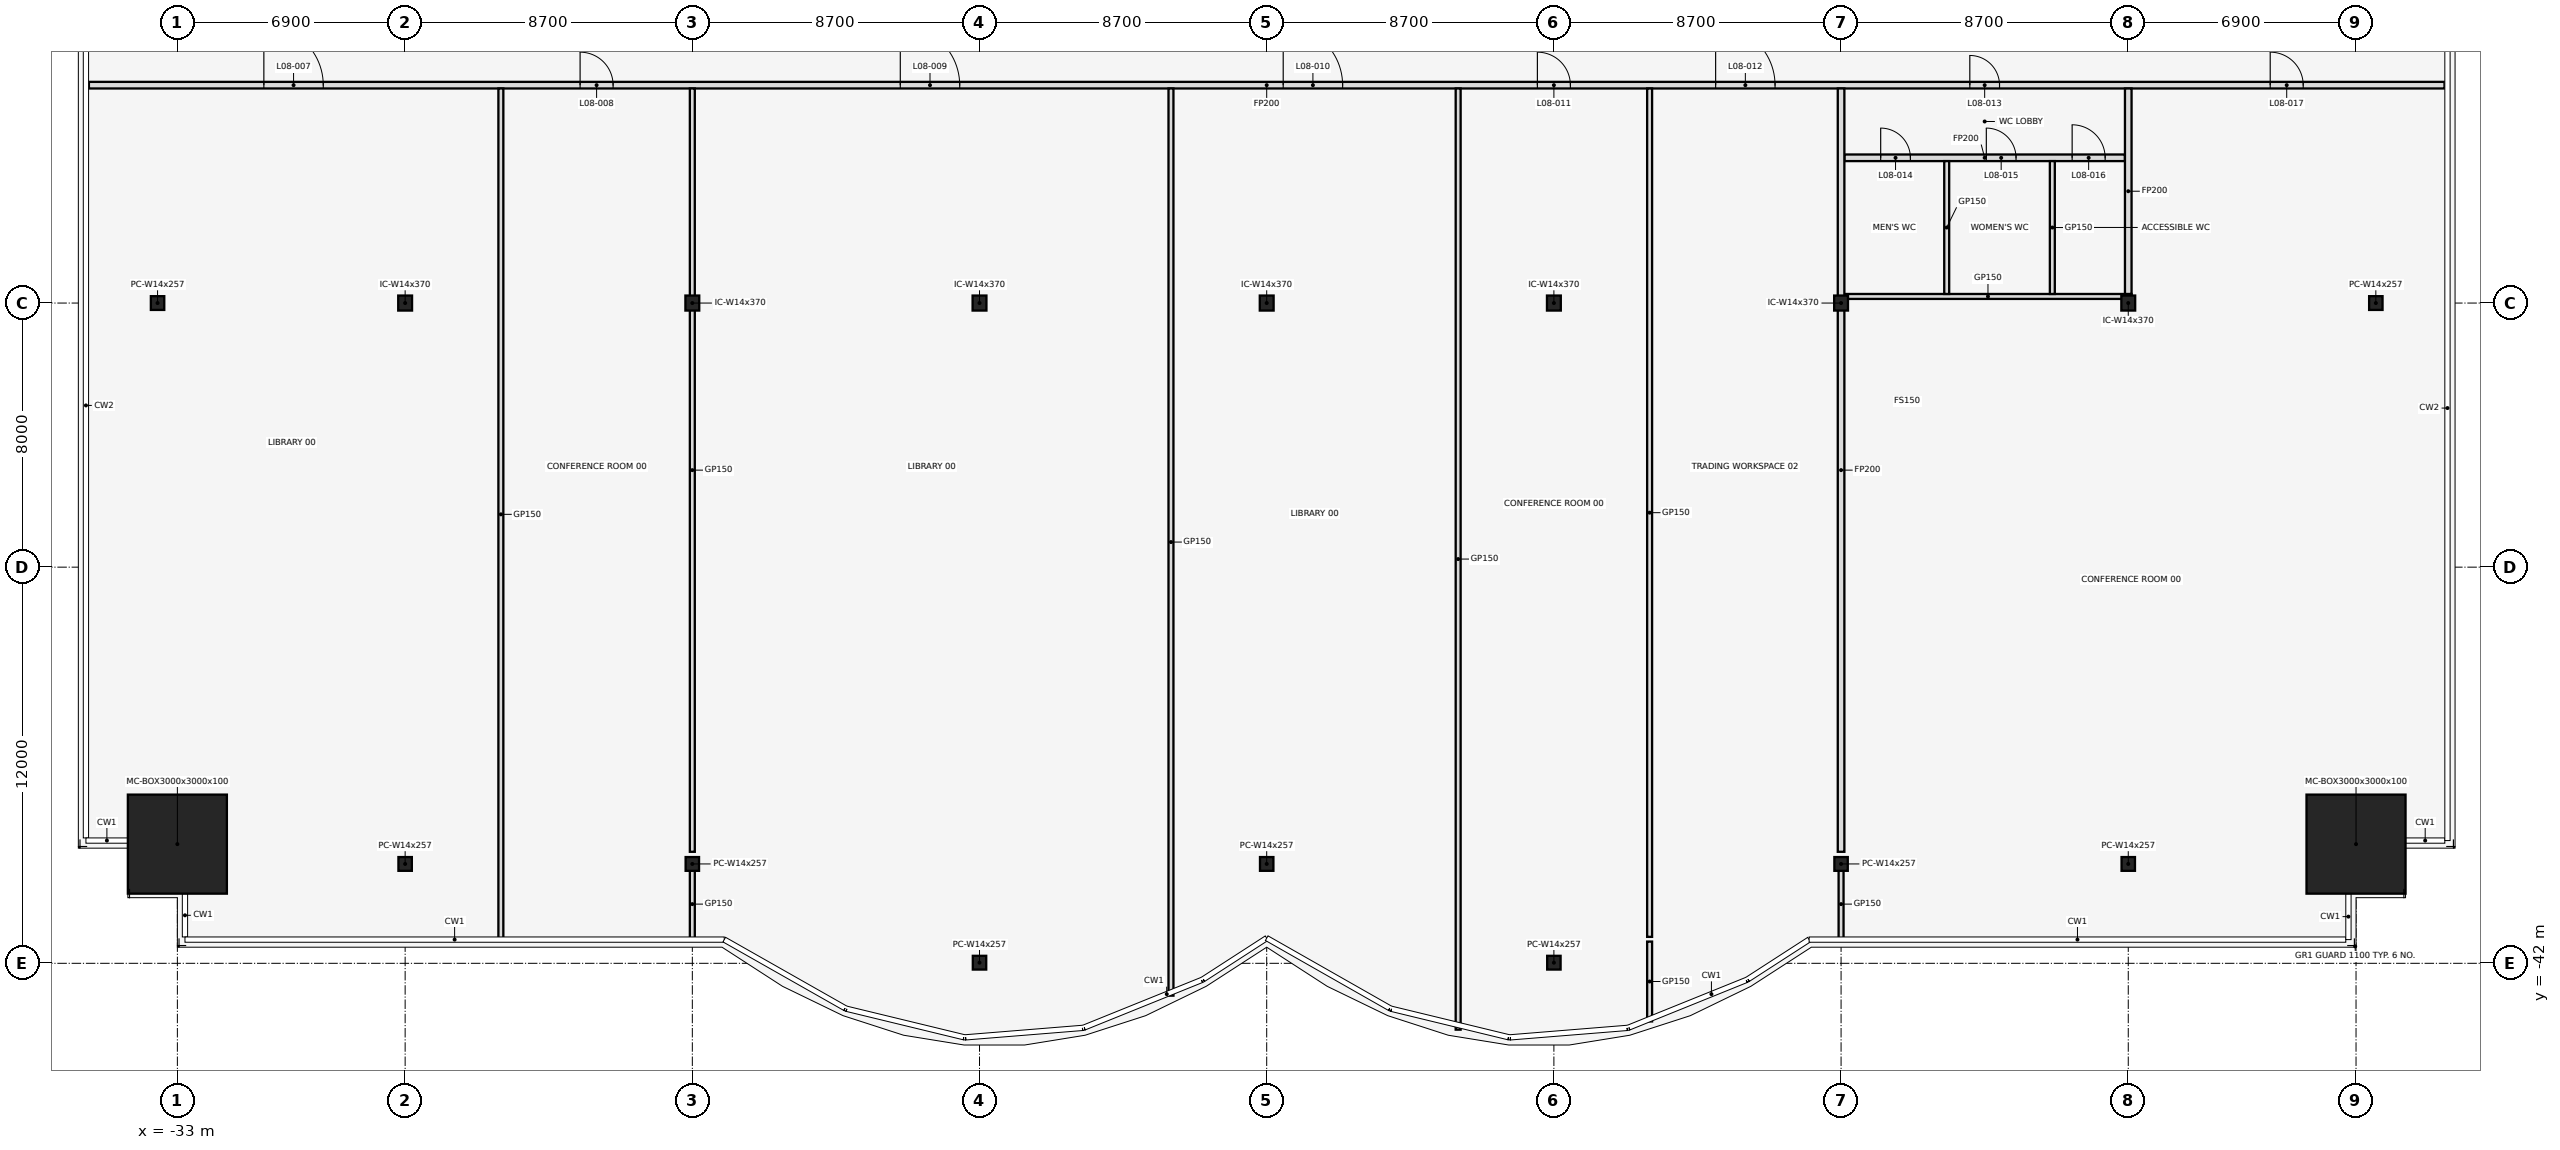
"""IFC4 building model, lengths in metres.
Left out: names, types, materials, properties, quantities, classifications, styles, units other than length and angle.
Written with IfcOpenShell. Run it as: python <this file> out.ifc"""

import sys

from ifc_helpers import new_model, si_unit, direction, frame, frame_2d, origin, origin_2d, place, context, subcontext, project, spatial, rectangle, hollow_rectangle, i_section, extrude, element, fill, save


model = new_model("IFC4")
c1 = context("Model", 3, precision=1e-05, world=origin(), true_north=direction((0.0, 1.0)))
c2 = subcontext(c1, "Body", "Model", "MODEL_VIEW")
j1 = project(units=[si_unit("LENGTHUNIT", "METRE"), si_unit("PLANEANGLEUNIT", "RADIAN")], contexts=[c1])
p1 = place(None, origin())
s1 = spatial("IfcSite", under=j1, at=p1, CompositionType="ELEMENT")
p2 = place(p1, origin())
s2 = spatial("IfcBuilding", under=s1, at=p2, CompositionType="ELEMENT")
p3 = place(p2, frame((0.0, 0.0, 44.0)))
s3 = spatial("IfcBuildingStorey", under=s2, at=p3, CompositionType="ELEMENT", Elevation=44.0)
p4 = place(p3, frame((-33.0, -38.39, 0.0), z_axis=(0.0, 0.0, 1.0), x_axis=(1.0, 0.0, 0.0)))
e1 = element("IfcColumn", 1, at=p4, inside=s3, PredefinedType="COLUMN", context=c2, shape_type="SweptSolid", body=[
    extrude(hollow_rectangle(XDim=3.0, YDim=3.0, WallThickness=0.1, at=origin_2d()), origin(), (0.0, 0.0, 1.0), 4.5),
])
for number, where, z_axis, x_axis in (
    (2, (-26.1, -38.99, 0.0), (0.0, 0.0, 1.0), (1.0, 0.0, 0.0)),
    (3, (-17.4, -38.99, 0.0), (0.0, 0.0, 1.0), (1.0, 0.0, 0.0)),
    (4, (-8.7, -41.981, 0.0), (0.0, 0.0, 1.0), (1.0, 0.0, 0.0)),
    (5, (0.0, -38.99, 0.0), (0.0, 0.0, 1.0), (1.0, 0.0, 0.0)),
    (6, (8.7, -41.981, 0.0), (0.0, 0.0, 1.0), (1.0, 0.0, 0.0)),
    (7, (17.4, -38.99, 0.0), (0.0, 0.0, 1.0), (1.0, 0.0, 0.0)),
    (8, (26.1, -38.99, 0.0), (0.0, 0.0, 1.0), (1.0, 0.0, 0.0)),
):
    element("IfcColumn", number, at=place(p3, frame(where, z_axis=z_axis, x_axis=x_axis)), inside=s3, PredefinedType="COLUMN", context=c2, shape_type="SweptSolid", body=[
        extrude(i_section(OverallWidth=0.406, OverallDepth=0.417, WebThickness=0.03, FlangeThickness=0.048, at=origin_2d()), origin(), (0.0, 0.0, 1.0), 4.5),
    ])
p5 = place(p3, frame((33.0, -38.39, 0.0), z_axis=(0.0, 0.0, 1.0), x_axis=(1.0, 0.0, 0.0)))
e9 = element("IfcColumn", 9, at=p5, inside=s3, PredefinedType="COLUMN", context=c2, shape_type="SweptSolid", body=[
    extrude(hollow_rectangle(XDim=3.0, YDim=3.0, WallThickness=0.1, at=origin_2d()), origin(), (0.0, 0.0, 1.0), 4.5),
])
for number, where, z_axis, x_axis in (
    (10, (-33.6, -22.0, 0.0), (0.0, 0.0, 1.0), (1.0, 0.0, 0.0)),
    (11, (33.6, -22.0, 0.0), (0.0, 0.0, 1.0), (1.0, 0.0, 0.0)),
):
    element("IfcColumn", number, at=place(p3, frame(where, z_axis=z_axis, x_axis=x_axis)), inside=s3, PredefinedType="COLUMN", context=c2, shape_type="SweptSolid", body=[
        extrude(i_section(OverallWidth=0.406, OverallDepth=0.417, WebThickness=0.03, FlangeThickness=0.048, at=origin_2d()), origin(), (0.0, 0.0, 1.0), 4.5),
    ])
for number, where, z_axis, x_axis in (
    (12, (-26.1, -22.0, 0.0), (0.0, 0.0, 1.0), (1.0, 0.0, 0.0)),
    (13, (-17.4, -22.0, 0.0), (0.0, 0.0, 1.0), (1.0, 0.0, 0.0)),
    (14, (-8.7, -22.0, 0.0), (0.0, 0.0, 1.0), (1.0, 0.0, 0.0)),
    (15, (0.0, -22.0, 0.0), (0.0, 0.0, 1.0), (1.0, 0.0, 0.0)),
    (16, (8.7, -22.0, 0.0), (0.0, 0.0, 1.0), (1.0, 0.0, 0.0)),
    (17, (17.4, -22.0, 0.0), (0.0, 0.0, 1.0), (1.0, 0.0, 0.0)),
    (18, (26.1, -22.0, 0.0), (0.0, 0.0, 1.0), (1.0, 0.0, 0.0)),
):
    element("IfcColumn", number, at=place(p3, frame(where, z_axis=z_axis, x_axis=x_axis)), inside=s3, PredefinedType="COLUMN", context=c2, shape_type="SweptSolid", body=[
        extrude(i_section(OverallWidth=0.419, OverallDepth=0.455, WebThickness=0.042, FlangeThickness=0.068, at=origin_2d()), origin(), (0.0, 0.0, 1.0), 4.5),
    ])
p6 = place(p3, frame((17.5, -21.8, 0.0), z_axis=(0.0, 0.0, 1.0), x_axis=(1.0, 0.0, 0.0)))
e19 = element("IfcWall", 19, at=p6, inside=s3, PredefinedType="PARTITIONING", context=c2, shape_type="SweptSolid", body=[
    extrude(rectangle(XDim=8.7, YDim=0.15, at=frame_2d((4.35, 0.0))), origin(), (0.0, 0.0, 1.0), 3.418),
])
p7 = place(p3, frame((17.5, -17.6, 0.0), z_axis=(0.0, 0.0, 1.0), x_axis=(1.0, 0.0, 0.0)))
e20 = element("IfcWall", 20, at=p7, inside=s3, PredefinedType="PARTITIONING", context=c2, shape_type="SweptSolid", body=[
    extrude(rectangle(XDim=8.5, YDim=0.2, at=frame_2d((4.25, 0.0))), origin(), (0.0, 0.0, 1.0), 3.418),
])
p8 = place(p7, frame((1.1, 0.0, 0.0)))
e21 = element("IfcOpeningElement", 21, at=p8, cuts=e20, PredefinedType="OPENING", context=c2, shape_type="SweptSolid", body=[
    extrude(rectangle(XDim=0.9, YDim=2.1, at=frame_2d((0.45, 1.05))), frame((0.0, 0.112, 0.0), z_axis=(0.0, -1.0, 0.0), x_axis=(1.0, 0.0, 0.0)), (0.0, 0.0, 1.0), 0.224),
])
p9 = place(p7, frame((4.3, 0.0, 0.0)))
e22 = element("IfcOpeningElement", 22, at=p9, cuts=e20, PredefinedType="OPENING", context=c2, shape_type="SweptSolid", body=[
    extrude(rectangle(XDim=0.9, YDim=2.1, at=frame_2d((0.45, 1.05))), frame((0.0, 0.112, 0.0), z_axis=(0.0, -1.0, 0.0), x_axis=(1.0, 0.0, 0.0)), (0.0, 0.0, 1.0), 0.224),
])
p10 = place(p7, frame((6.9, 0.0, 0.0)))
e23 = element("IfcOpeningElement", 23, at=p10, cuts=e20, PredefinedType="OPENING", context=c2, shape_type="SweptSolid", body=[
    extrude(rectangle(XDim=1.0, YDim=2.1, at=frame_2d((0.5, 1.05))), frame((0.0, 0.112, 0.0), z_axis=(0.0, -1.0, 0.0), x_axis=(1.0, 0.0, 0.0)), (0.0, 0.0, 1.0), 0.224),
])
p11 = place(p3, frame((-35.68, -15.4, 0.0), z_axis=(0.0, 0.0, 1.0), x_axis=(1.0, 0.0, 0.0)))
e24 = element("IfcWall", 24, at=p11, inside=s3, PredefinedType="PARTITIONING", context=c2, shape_type="SweptSolid", body=[
    extrude(rectangle(XDim=71.36, YDim=0.2, at=frame_2d((35.68, 0.0))), origin(), (0.0, 0.0, 1.0), 3.418),
])
p12 = place(p11, frame((5.3, 0.0, 0.0)))
e25 = element("IfcOpeningElement", 25, at=p12, cuts=e24, PredefinedType="OPENING", context=c2, shape_type="SweptSolid", body=[
    extrude(rectangle(XDim=1.8, YDim=2.1, at=frame_2d((0.9, 1.05))), frame((0.0, 0.112, 0.0), z_axis=(0.0, -1.0, 0.0), x_axis=(1.0, 0.0, 0.0)), (0.0, 0.0, 1.0), 0.224),
])
p13 = place(p11, frame((14.88, 0.0, 0.0)))
e26 = element("IfcOpeningElement", 26, at=p13, cuts=e24, PredefinedType="OPENING", context=c2, shape_type="SweptSolid", body=[
    extrude(rectangle(XDim=1.0, YDim=2.1, at=frame_2d((0.5, 1.05))), frame((0.0, 0.112, 0.0), z_axis=(0.0, -1.0, 0.0), x_axis=(1.0, 0.0, 0.0)), (0.0, 0.0, 1.0), 0.224),
])
p14 = place(p11, frame((24.58, 0.0, 0.0)))
e27 = element("IfcOpeningElement", 27, at=p14, cuts=e24, PredefinedType="OPENING", context=c2, shape_type="SweptSolid", body=[
    extrude(rectangle(XDim=1.8, YDim=2.1, at=frame_2d((0.9, 1.05))), frame((0.0, 0.112, 0.0), z_axis=(0.0, -1.0, 0.0), x_axis=(1.0, 0.0, 0.0)), (0.0, 0.0, 1.0), 0.224),
])
p15 = place(p11, frame((36.18, 0.0, 0.0)))
e28 = element("IfcOpeningElement", 28, at=p15, cuts=e24, PredefinedType="OPENING", context=c2, shape_type="SweptSolid", body=[
    extrude(rectangle(XDim=1.8, YDim=2.1, at=frame_2d((0.9, 1.05))), frame((0.0, 0.112, 0.0), z_axis=(0.0, -1.0, 0.0), x_axis=(1.0, 0.0, 0.0)), (0.0, 0.0, 1.0), 0.224),
])
p16 = place(p11, frame((43.88, 0.0, 0.0)))
e29 = element("IfcOpeningElement", 29, at=p16, cuts=e24, PredefinedType="OPENING", context=c2, shape_type="SweptSolid", body=[
    extrude(rectangle(XDim=1.0, YDim=2.1, at=frame_2d((0.5, 1.05))), frame((0.0, 0.112, 0.0), z_axis=(0.0, -1.0, 0.0), x_axis=(1.0, 0.0, 0.0)), (0.0, 0.0, 1.0), 0.224),
])
p17 = place(p11, frame((49.28, 0.0, 0.0)))
e30 = element("IfcOpeningElement", 30, at=p17, cuts=e24, PredefinedType="OPENING", context=c2, shape_type="SweptSolid", body=[
    extrude(rectangle(XDim=1.8, YDim=2.1, at=frame_2d((0.9, 1.05))), frame((0.0, 0.112, 0.0), z_axis=(0.0, -1.0, 0.0), x_axis=(1.0, 0.0, 0.0)), (0.0, 0.0, 1.0), 0.224),
])
p18 = place(p11, frame((56.98, 0.0, 0.0)))
e31 = element("IfcOpeningElement", 31, at=p18, cuts=e24, PredefinedType="OPENING", context=c2, shape_type="SweptSolid", body=[
    extrude(rectangle(XDim=0.9, YDim=2.1, at=frame_2d((0.45, 1.05))), frame((0.0, 0.112, 0.0), z_axis=(0.0, -1.0, 0.0), x_axis=(1.0, 0.0, 0.0)), (0.0, 0.0, 1.0), 0.224),
])
p19 = place(p11, frame((66.08, 0.0, 0.0)))
e32 = element("IfcOpeningElement", 32, at=p19, cuts=e24, PredefinedType="OPENING", context=c2, shape_type="SweptSolid", body=[
    extrude(rectangle(XDim=1.0, YDim=2.1, at=frame_2d((0.5, 1.05))), frame((0.0, 0.112, 0.0), z_axis=(0.0, -1.0, 0.0), x_axis=(1.0, 0.0, 0.0)), (0.0, 0.0, 1.0), 0.224),
])
p20 = place(p3, frame((-23.2, -41.3, 0.0), z_axis=(0.0, 0.0, 1.0), x_axis=(0.0, 1.0, 0.0)))
e33 = element("IfcWall", 33, at=p20, inside=s3, PredefinedType="PARTITIONING", context=c2, shape_type="SweptSolid", body=[
    extrude(rectangle(XDim=25.8, YDim=0.15, at=frame_2d((12.9, 0.0))), origin(), (0.0, 0.0, 1.0), 3.418),
])
p21 = place(p3, frame((-17.4, -41.3, 0.0), z_axis=(0.0, 0.0, 1.0), x_axis=(0.0, 1.0, 0.0)))
e34 = element("IfcWall", 34, at=p21, inside=s3, PredefinedType="PARTITIONING", context=c2, shape_type="SweptSolid", body=[
    extrude(rectangle(XDim=2.186, YDim=0.15, at=frame_2d((1.093, 0.0))), origin(), (0.0, 0.0, 1.0), 3.418),
])
p22 = place(p3, frame((-17.4, -38.622, 0.0), z_axis=(0.0, 0.0, 1.0), x_axis=(0.0, 1.0, 0.0)))
e35 = element("IfcWall", 35, at=p22, inside=s3, PredefinedType="PARTITIONING", context=c2, shape_type="SweptSolid", body=[
    extrude(rectangle(XDim=23.122, YDim=0.15, at=frame_2d((11.561, 0.0))), origin(), (0.0, 0.0, 1.0), 3.418),
])
p23 = place(p3, frame((-2.9, -42.98, 0.0), z_axis=(0.0, 0.0, 1.0), x_axis=(0.0, 1.0, 0.0)))
e36 = element("IfcWall", 36, at=p23, inside=s3, PredefinedType="PARTITIONING", context=c2, shape_type="SweptSolid", body=[
    extrude(rectangle(XDim=27.48, YDim=0.15, at=frame_2d((13.74, 0.0))), origin(), (0.0, 0.0, 1.0), 3.418),
])
p24 = place(p3, frame((5.8, -44.01, 0.0), z_axis=(0.0, 0.0, 1.0), x_axis=(0.0, 1.0, 0.0)))
e37 = element("IfcWall", 37, at=p24, inside=s3, PredefinedType="PARTITIONING", context=c2, shape_type="SweptSolid", body=[
    extrude(rectangle(XDim=28.51, YDim=0.15, at=frame_2d((14.255, 0.0))), origin(), (0.0, 0.0, 1.0), 3.418),
])
p25 = place(p3, frame((11.6, -43.76, 0.0), z_axis=(0.0, 0.0, 1.0), x_axis=(0.0, 1.0, 0.0)))
e38 = element("IfcWall", 38, at=p25, inside=s3, PredefinedType="PARTITIONING", context=c2, shape_type="SweptSolid", body=[
    extrude(rectangle(XDim=2.418, YDim=0.15, at=frame_2d((1.209, 0.0))), origin(), (0.0, 0.0, 1.0), 3.418),
])
p26 = place(p3, frame((11.6, -41.199, 0.0), z_axis=(0.0, 0.0, 1.0), x_axis=(0.0, 1.0, 0.0)))
e39 = element("IfcWall", 39, at=p26, inside=s3, PredefinedType="PARTITIONING", context=c2, shape_type="SweptSolid", body=[
    extrude(rectangle(XDim=25.699, YDim=0.15, at=frame_2d((12.85, 0.0))), origin(), (0.0, 0.0, 1.0), 3.418),
])
p27 = place(p3, frame((17.4, -41.3, 0.0), z_axis=(0.0, 0.0, 1.0), x_axis=(0.0, 1.0, 0.0)))
e40 = element("IfcWall", 40, at=p27, inside=s3, PredefinedType="PARTITIONING", context=c2, shape_type="SweptSolid", body=[
    extrude(rectangle(XDim=2.186, YDim=0.15, at=frame_2d((1.093, 0.0))), origin(), (0.0, 0.0, 1.0), 3.418),
])
p28 = place(p3, frame((17.4, -38.622, 0.0), z_axis=(0.0, 0.0, 1.0), x_axis=(0.0, 1.0, 0.0)))
e41 = element("IfcWall", 41, at=p28, inside=s3, PredefinedType="PARTITIONING", context=c2, shape_type="SweptSolid", body=[
    extrude(rectangle(XDim=23.122, YDim=0.2, at=frame_2d((11.561, 0.0))), origin(), (0.0, 0.0, 1.0), 3.418),
])
for number, where, z_axis, x_axis in (
    (42, (20.6, -21.725, 0.0), (0.0, 0.0, 1.0), (0.0, 1.0, 0.0)),
    (43, (23.8, -21.725, 0.0), (0.0, 0.0, 1.0), (0.0, 1.0, 0.0)),
):
    element("IfcWall", number, at=place(p3, frame(where, z_axis=z_axis, x_axis=x_axis)), inside=s3, PredefinedType="PARTITIONING", context=c2, shape_type="SweptSolid", body=[
        extrude(rectangle(XDim=4.025, YDim=0.15, at=frame_2d((2.013, 0.0))), origin(), (0.0, 0.0, 1.0), 3.418),
    ])
p29 = place(p3, frame((26.1, -21.725, 0.0), z_axis=(0.0, 0.0, 1.0), x_axis=(0.0, 1.0, 0.0)))
e44 = element("IfcWall", 44, at=p29, inside=s3, PredefinedType="PARTITIONING", context=c2, shape_type="SweptSolid", body=[
    extrude(rectangle(XDim=6.225, YDim=0.2, at=frame_2d((3.113, 0.0))), origin(), (0.0, 0.0, 1.0), 3.418),
])
p30 = place(p12, origin())
e45 = element("IfcDoor", 45, at=p30, inside=s3, OperationType="SINGLE_SWING_LEFT", PredefinedType="DOOR", context=c2, shape_type="SweptSolid", body=[
    extrude(rectangle(XDim=1.8, YDim=2.1, at=frame_2d((0.9, 1.05))), frame((0.0, 0.025, 0.0), z_axis=(0.0, -1.0, 0.0), x_axis=(1.0, 0.0, 0.0)), (0.0, 0.0, 1.0), 0.05),
])
fill(e25, e45)
p31 = place(p13, frame((1.0, 0.0, 0.0), z_axis=(0.0, 0.0, 1.0), x_axis=(-1.0, 0.0, 0.0)))
e46 = element("IfcDoor", 46, at=p31, inside=s3, OperationType="SINGLE_SWING_RIGHT", PredefinedType="DOOR", context=c2, shape_type="SweptSolid", body=[
    extrude(rectangle(XDim=1.0, YDim=2.1, at=frame_2d((0.5, 1.05))), frame((0.0, 0.025, 0.0), z_axis=(0.0, -1.0, 0.0), x_axis=(1.0, 0.0, 0.0)), (0.0, 0.0, 1.0), 0.05),
])
fill(e26, e46)
p32 = place(p14, origin())
e47 = element("IfcDoor", 47, at=p32, inside=s3, OperationType="SINGLE_SWING_LEFT", PredefinedType="DOOR", context=c2, shape_type="SweptSolid", body=[
    extrude(rectangle(XDim=1.8, YDim=2.1, at=frame_2d((0.9, 1.05))), frame((0.0, 0.025, 0.0), z_axis=(0.0, -1.0, 0.0), x_axis=(1.0, 0.0, 0.0)), (0.0, 0.0, 1.0), 0.05),
])
fill(e27, e47)
p33 = place(p15, origin())
e48 = element("IfcDoor", 48, at=p33, inside=s3, OperationType="SINGLE_SWING_LEFT", PredefinedType="DOOR", context=c2, shape_type="SweptSolid", body=[
    extrude(rectangle(XDim=1.8, YDim=2.1, at=frame_2d((0.9, 1.05))), frame((0.0, 0.025, 0.0), z_axis=(0.0, -1.0, 0.0), x_axis=(1.0, 0.0, 0.0)), (0.0, 0.0, 1.0), 0.05),
])
fill(e28, e48)
p34 = place(p16, frame((1.0, 0.0, 0.0), z_axis=(0.0, 0.0, 1.0), x_axis=(-1.0, 0.0, 0.0)))
e49 = element("IfcDoor", 49, at=p34, inside=s3, OperationType="SINGLE_SWING_RIGHT", PredefinedType="DOOR", context=c2, shape_type="SweptSolid", body=[
    extrude(rectangle(XDim=1.0, YDim=2.1, at=frame_2d((0.5, 1.05))), frame((0.0, 0.025, 0.0), z_axis=(0.0, -1.0, 0.0), x_axis=(1.0, 0.0, 0.0)), (0.0, 0.0, 1.0), 0.05),
])
fill(e29, e49)
p35 = place(p17, origin())
e50 = element("IfcDoor", 50, at=p35, inside=s3, OperationType="SINGLE_SWING_LEFT", PredefinedType="DOOR", context=c2, shape_type="SweptSolid", body=[
    extrude(rectangle(XDim=1.8, YDim=2.1, at=frame_2d((0.9, 1.05))), frame((0.0, 0.025, 0.0), z_axis=(0.0, -1.0, 0.0), x_axis=(1.0, 0.0, 0.0)), (0.0, 0.0, 1.0), 0.05),
])
fill(e30, e50)
p36 = place(p18, frame((0.9, 0.0, 0.0), z_axis=(0.0, 0.0, 1.0), x_axis=(-1.0, 0.0, 0.0)))
e51 = element("IfcDoor", 51, at=p36, inside=s3, OperationType="SINGLE_SWING_LEFT", PredefinedType="DOOR", context=c2, shape_type="SweptSolid", body=[
    extrude(rectangle(XDim=0.9, YDim=2.1, at=frame_2d((0.45, 1.05))), frame((0.0, 0.025, 0.0), z_axis=(0.0, -1.0, 0.0), x_axis=(1.0, 0.0, 0.0)), (0.0, 0.0, 1.0), 0.05),
])
fill(e31, e51)
p37 = place(p8, frame((0.9, 0.0, 0.0), z_axis=(0.0, 0.0, 1.0), x_axis=(-1.0, 0.0, 0.0)))
e52 = element("IfcDoor", 52, at=p37, inside=s3, OperationType="SINGLE_SWING_RIGHT", PredefinedType="DOOR", context=c2, shape_type="SweptSolid", body=[
    extrude(rectangle(XDim=0.9, YDim=2.1, at=frame_2d((0.45, 1.05))), frame((0.0, 0.025, 0.0), z_axis=(0.0, -1.0, 0.0), x_axis=(1.0, 0.0, 0.0)), (0.0, 0.0, 1.0), 0.05),
])
fill(e21, e52)
p38 = place(p9, frame((0.9, 0.0, 0.0), z_axis=(0.0, 0.0, 1.0), x_axis=(-1.0, 0.0, 0.0)))
e53 = element("IfcDoor", 53, at=p38, inside=s3, OperationType="SINGLE_SWING_RIGHT", PredefinedType="DOOR", context=c2, shape_type="SweptSolid", body=[
    extrude(rectangle(XDim=0.9, YDim=2.1, at=frame_2d((0.45, 1.05))), frame((0.0, 0.025, 0.0), z_axis=(0.0, -1.0, 0.0), x_axis=(1.0, 0.0, 0.0)), (0.0, 0.0, 1.0), 0.05),
])
fill(e22, e53)
p39 = place(p10, frame((1.0, 0.0, 0.0), z_axis=(0.0, 0.0, 1.0), x_axis=(-1.0, 0.0, 0.0)))
e54 = element("IfcDoor", 54, at=p39, inside=s3, OperationType="SINGLE_SWING_LEFT", PredefinedType="DOOR", context=c2, shape_type="SweptSolid", body=[
    extrude(rectangle(XDim=1.0, YDim=2.1, at=frame_2d((0.5, 1.05))), frame((0.0, 0.025, 0.0), z_axis=(0.0, -1.0, 0.0), x_axis=(1.0, 0.0, 0.0)), (0.0, 0.0, 1.0), 0.05),
])
fill(e23, e54)
p40 = place(p19, frame((1.0, 0.0, 0.0), z_axis=(0.0, 0.0, 1.0), x_axis=(-1.0, 0.0, 0.0)))
e55 = element("IfcDoor", 55, at=p40, inside=s3, OperationType="SINGLE_SWING_RIGHT", PredefinedType="DOOR", context=c2, shape_type="SweptSolid", body=[
    extrude(rectangle(XDim=1.0, YDim=2.1, at=frame_2d((0.5, 1.05))), frame((0.0, 0.025, 0.0), z_axis=(0.0, -1.0, 0.0), x_axis=(1.0, 0.0, 0.0)), (0.0, 0.0, 1.0), 0.05),
])
fill(e32, e55)
save(model, sys.argv[1])
